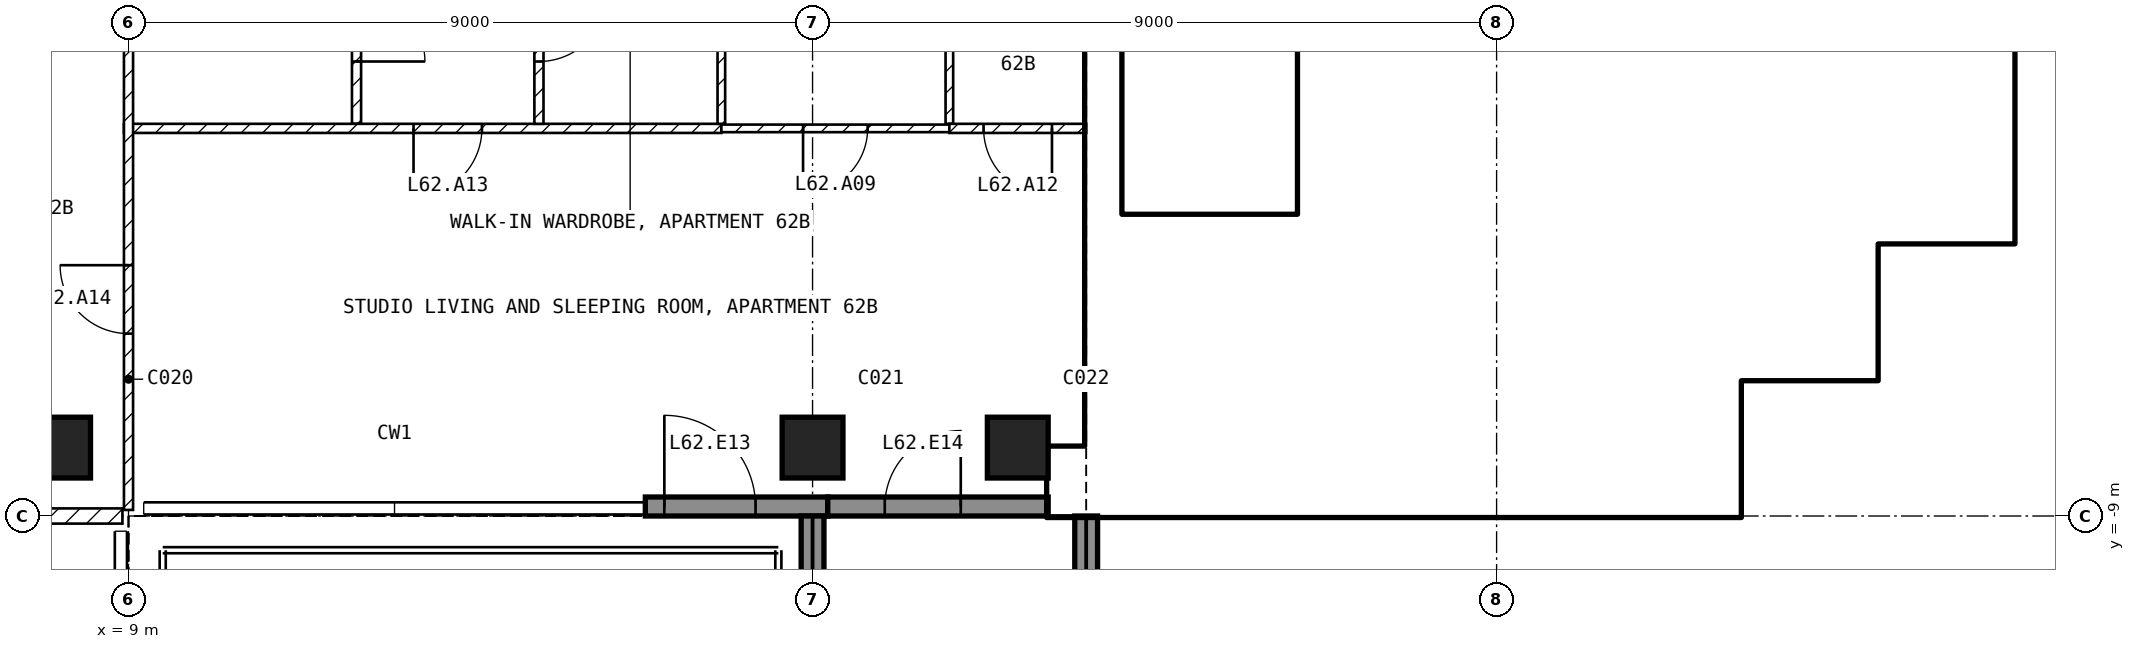
"""IFC4 building model, lengths in metres.
Left out: names, types, materials, properties, quantities, classifications, styles, units other than length and angle.
Written with IfcOpenShell. Run it as: python <this file> out.ifc"""

import sys

from ifc_helpers import new_model, si_unit, direction, frame, frame_2d, origin, origin_2d, place, context, subcontext, project, spatial, rectangle, extrude, element, fill, save


model = new_model("IFC4")
c1 = context("Model", 3, precision=1e-05, world=origin(), true_north=direction((0.0, 1.0)))
c2 = subcontext(c1, "Body", "Model", "MODEL_VIEW")
j1 = project(units=[si_unit("LENGTHUNIT", "METRE"), si_unit("PLANEANGLEUNIT", "RADIAN")], contexts=[c1])
p1 = place(None, origin())
s1 = spatial("IfcSite", under=j1, at=p1, CompositionType="ELEMENT")
p2 = place(p1, origin())
s2 = spatial("IfcBuilding", under=s1, at=p2, CompositionType="ELEMENT")
p3 = place(p2, frame((0.0, 0.0, 246.5)))
s3 = spatial("IfcBuildingStorey", under=s2, at=p3, CompositionType="ELEMENT", Elevation=246.5)
for number, where, z_axis, x_axis in (
    (1, (8.1, -8.1, -0.25), (0.0, 0.0, 1.0), (1.0, 0.0, 0.0)),
    (2, (18.0, -8.1, -0.25), (0.0, 0.0, 1.0), (1.0, 0.0, 0.0)),
    (3, (20.7, -8.1, -0.25), (0.0, 0.0, 1.0), (1.0, 0.0, 0.0)),
):
    element("IfcColumn", number, at=place(p3, frame(where, z_axis=z_axis, x_axis=x_axis)), inside=s3, PredefinedType="COLUMN", context=c2, shape_type="SweptSolid", body=[
        extrude(rectangle(XDim=0.8, YDim=0.8, at=origin_2d()), origin(), (0.0, 0.0, 1.0), 3.5),
    ])
p4 = place(p3, frame((15.8, -8.875, 0.0), z_axis=(0.0, 0.0, 1.0), x_axis=(1.0, 0.0, 0.0)))
e4 = element("IfcWall", 4, at=p4, inside=s3, PredefinedType="SOLIDWALL", context=c2, shape_type="SweptSolid", body=[
    extrude(rectangle(XDim=2.4, YDim=0.25, at=frame_2d((1.2, 0.0))), origin(), (0.0, 0.0, 1.0), 3.25),
])
p5 = place(p4, frame((0.25, 0.0, 0.0)))
e5 = element("IfcOpeningElement", 5, at=p5, cuts=e4, PredefinedType="OPENING", context=c2, shape_type="SweptSolid", body=[
    extrude(rectangle(XDim=1.2, YDim=2.4, at=frame_2d((0.6, 1.2))), frame((0.0, 0.135, 0.0), z_axis=(0.0, -1.0, 0.0), x_axis=(1.0, 0.0, 0.0)), (0.0, 0.0, 1.0), 0.27),
])
p6 = place(p3, frame((18.2, -8.875, 0.0), z_axis=(0.0, 0.0, 1.0), x_axis=(1.0, 0.0, 0.0)))
e6 = element("IfcWall", 6, at=p6, inside=s3, PredefinedType="SOLIDWALL", context=c2, shape_type="SweptSolid", body=[
    extrude(rectangle(XDim=2.9, YDim=0.25, at=frame_2d((1.45, 0.0))), origin(), (0.0, 0.0, 1.0), 3.25),
])
p7 = place(p6, frame((0.75, 0.0, 0.0)))
e7 = element("IfcOpeningElement", 7, at=p7, cuts=e6, PredefinedType="OPENING", context=c2, shape_type="SweptSolid", body=[
    extrude(rectangle(XDim=1.0, YDim=2.4, at=frame_2d((0.5, 1.2))), frame((0.0, 0.135, 0.0), z_axis=(0.0, -1.0, 0.0), x_axis=(1.0, 0.0, 0.0)), (0.0, 0.0, 1.0), 0.27),
])
p8 = place(p3, frame((18.0, -9.0, 0.0), z_axis=(0.0, 0.0, 1.0), x_axis=(0.0, -1.0, 0.0)))
e8 = element("IfcWall", 8, at=p8, inside=s3, PredefinedType="SOLIDWALL", context=c2, shape_type="SweptSolid", body=[
    extrude(rectangle(XDim=2.74, YDim=0.3, at=frame_2d((1.37, 0.0))), origin(), (0.0, 0.0, 1.0), 3.25),
])
p9 = place(p3, frame((21.6, -9.0, 0.0), z_axis=(0.0, 0.0, 1.0), x_axis=(0.0, -1.0, 0.0)))
e9 = element("IfcWall", 9, at=p9, inside=s3, PredefinedType="SOLIDWALL", context=c2, shape_type="SweptSolid", body=[
    extrude(rectangle(XDim=2.7, YDim=0.3, at=frame_2d((1.35, 0.0))), origin(), (0.0, 0.0, 1.0), 3.25),
])
p10 = place(p3, frame((21.1, -8.55, 0.0), z_axis=(0.0, 0.0, 1.0), x_axis=(1.0, 0.0, 0.0)))
e10 = element("IfcWall", 10, at=p10, inside=s3, PredefinedType="SHEAR", context=c2, shape_type="SweptSolid", body=[
    extrude(rectangle(XDim=9.1, YDim=0.9, at=frame_2d((4.55, 0.0))), origin(), (0.0, 0.0, 1.0), 3.25),
])
p11 = place(p3, frame((29.975, -8.1, 0.0), z_axis=(0.0, 0.0, 1.0), x_axis=(0.0, 1.0, 0.0)))
e11 = element("IfcWall", 11, at=p11, inside=s3, PredefinedType="SHEAR", context=c2, shape_type="SweptSolid", body=[
    extrude(rectangle(XDim=1.35, YDim=0.45, at=frame_2d((0.675, 0.0))), origin(), (0.0, 0.0, 1.0), 3.25),
])
for number, where, z_axis, x_axis in (
    (12, (30.2, -6.975, 0.0), (0.0, 0.0, 1.0), (1.0, 0.0, 0.0)),
    (13, (31.775, -6.75, 0.0), (0.0, 0.0, 1.0), (0.0, 1.0, 0.0)),
    (14, (32.0, -5.175, 0.0), (0.0, 0.0, 1.0), (1.0, 0.0, 0.0)),
):
    element("IfcWall", number, at=place(p3, frame(where, z_axis=z_axis, x_axis=x_axis)), inside=s3, PredefinedType="SHEAR", context=c2, shape_type="SweptSolid", body=[
        extrude(rectangle(XDim=1.8, YDim=0.45, at=frame_2d((0.9, 0.0))), origin(), (0.0, 0.0, 1.0), 3.25),
    ])
p12 = place(p3, frame((33.575, -4.95, 0.0), z_axis=(0.0, 0.0, 1.0), x_axis=(0.0, 1.0, 0.0)))
e15 = element("IfcWall", 15, at=p12, inside=s3, PredefinedType="SHEAR", context=c2, shape_type="SweptSolid", body=[
    extrude(rectangle(XDim=10.35, YDim=0.45, at=frame_2d((5.175, 0.0))), origin(), (0.0, 0.0, 1.0), 3.25),
])
p13 = place(p3, frame((21.825, -8.1, 0.0), z_axis=(0.0, 0.0, 1.0), x_axis=(0.0, 1.0, 0.0)))
e16 = element("IfcWall", 16, at=p13, inside=s3, PredefinedType="SHEAR", context=c2, shape_type="SweptSolid", body=[
    extrude(rectangle(XDim=6.9, YDim=0.45, at=frame_2d((3.45, 0.0))), origin(), (0.0, 0.0, 1.0), 3.25),
])
p14 = place(p3, frame((24.5, -5.05, 0.0), z_axis=(0.0, 0.0, 1.0), x_axis=(0.0, 1.0, 0.0)))
e17 = element("IfcWall", 17, at=p14, inside=s3, PredefinedType="SOLIDWALL", context=c2, shape_type="SweptSolid", body=[
    extrude(rectangle(XDim=3.7, YDim=0.2, at=frame_2d((1.85, 0.0))), origin(), (0.0, 0.0, 1.0), 3.25),
])
p15 = place(p14, frame((0.1, 0.0, 0.0)))
e18 = element("IfcOpeningElement", 18, at=p15, cuts=e17, PredefinedType="OPENING", context=c2, shape_type="SweptSolid", body=[
    extrude(rectangle(XDim=0.8, YDim=2.1, at=frame_2d((0.4, 1.05))), frame((0.0, 0.11, 0.0), z_axis=(0.0, -1.0, 0.0), x_axis=(1.0, 0.0, 0.0)), (0.0, 0.0, 1.0), 0.22),
])
p16 = place(p3, frame((22.05, -5.15, 0.0), z_axis=(0.0, 0.0, 1.0), x_axis=(1.0, 0.0, 0.0)))
e19 = element("IfcWall", 19, at=p16, inside=s3, PredefinedType="SOLIDWALL", context=c2, shape_type="SweptSolid", body=[
    extrude(rectangle(XDim=6.3, YDim=0.2, at=frame_2d((3.15, 0.0))), origin(), (0.0, 0.0, 1.0), 3.25),
])
p17 = place(p16, frame((0.2, 0.0, 0.0)))
e20 = element("IfcOpeningElement", 20, at=p17, cuts=e19, PredefinedType="OPENING", context=c2, shape_type="SweptSolid", body=[
    extrude(rectangle(XDim=1.0, YDim=2.1, at=frame_2d((0.5, 1.05))), frame((0.0, 0.11, 0.0), z_axis=(0.0, -1.0, 0.0), x_axis=(1.0, 0.0, 0.0)), (0.0, 0.0, 1.0), 0.22),
])
p18 = place(p3, frame((28.25, -8.1, 0.0), z_axis=(0.0, 0.0, 1.0), x_axis=(0.0, 1.0, 0.0)))
e21 = element("IfcWall", 21, at=p18, inside=s3, PredefinedType="SOLIDWALL", context=c2, shape_type="SweptSolid", body=[
    extrude(rectangle(XDim=2.85, YDim=0.2, at=frame_2d((1.425, 0.0))), origin(), (0.0, 0.0, 1.0), 3.25),
])
p19 = place(p3, frame((24.6, -3.95, 0.0), z_axis=(0.0, 0.0, 1.0), x_axis=(1.0, 0.0, 0.0)))
e22 = element("IfcWall", 22, at=p19, inside=s3, PredefinedType="SOLIDWALL", context=c2, shape_type="SweptSolid", body=[
    extrude(rectangle(XDim=8.75, YDim=0.2, at=frame_2d((4.375, 0.0))), origin(), (0.0, 0.0, 1.0), 3.25),
])
for number, where, z_axis, x_axis in (
    (23, (26.5, -3.85, 0.0), (0.0, 0.0, 1.0), (0.0, 1.0, 0.0)),
    (24, (28.5, -3.85, 0.0), (0.0, 0.0, 1.0), (0.0, 1.0, 0.0)),
    (25, (30.5, -3.85, 0.0), (0.0, 0.0, 1.0), (0.0, 1.0, 0.0)),
):
    element("IfcWall", number, at=place(p3, frame(where, z_axis=z_axis, x_axis=x_axis)), inside=s3, PredefinedType="SOLIDWALL", context=c2, shape_type="SweptSolid", body=[
        extrude(rectangle(XDim=2.3, YDim=0.2, at=frame_2d((1.15, 0.0))), origin(), (0.0, 0.0, 1.0), 3.25),
    ])
p20 = place(p3, frame((8.92, -9.0, 0.0), z_axis=(0.0, 0.0, 1.0), x_axis=(-1.0, 0.0, 0.0)))
e26 = element("IfcWall", 26, at=p20, inside=s3, PredefinedType="PARTITIONING", context=c2, shape_type="SweptSolid", body=[
    extrude(rectangle(XDim=17.84, YDim=0.2, at=frame_2d((8.92, 0.0))), origin(), (0.0, 0.0, 1.0), 3.25),
])
p21 = place(p20, frame((8.42, 0.0, 0.0)))
e27 = element("IfcOpeningElement", 27, at=p21, cuts=e26, PredefinedType="OPENING", context=c2, shape_type="SweptSolid", body=[
    extrude(rectangle(XDim=1.0, YDim=2.1, at=frame_2d((0.5, 1.05))), frame((0.0, 0.11, 0.0), z_axis=(0.0, -1.0, 0.0), x_axis=(1.0, 0.0, 0.0)), (0.0, 0.0, 1.0), 0.22),
])
p22 = place(p3, frame((12.0, -1.3, 0.0), z_axis=(0.0, 0.0, 1.0), x_axis=(0.0, -1.0, 0.0)))
e28 = element("IfcWall", 28, at=p22, inside=s3, PredefinedType="PARTITIONING", context=c2, shape_type="SweptSolid", body=[
    extrude(rectangle(XDim=2.54, YDim=0.12, at=frame_2d((1.27, 0.0))), origin(), (0.0, 0.0, 1.0), 3.25),
])
p23 = place(p22, frame((0.82, 0.0, 0.0)))
e29 = element("IfcOpeningElement", 29, at=p23, cuts=e28, PredefinedType="OPENING", context=c2, shape_type="SweptSolid", body=[
    extrude(rectangle(XDim=0.9, YDim=2.1, at=frame_2d((0.45, 1.05))), frame((0.0, 0.07, 0.0), z_axis=(0.0, -1.0, 0.0), x_axis=(1.0, 0.0, 0.0)), (0.0, 0.0, 1.0), 0.14),
])
p24 = place(p3, frame((16.8, -3.9, 0.0), z_axis=(0.0, 0.0, 1.0), x_axis=(-1.0, 0.0, 0.0)))
e30 = element("IfcWall", 30, at=p24, inside=s3, PredefinedType="PARTITIONING", context=c2, shape_type="SweptSolid", body=[
    extrude(rectangle(XDim=7.86, YDim=0.12, at=frame_2d((3.93, 0.0))), origin(), (0.0, 0.0, 1.0), 3.25),
])
p25 = place(p24, frame((3.15, 0.0, 0.0)))
e31 = element("IfcOpeningElement", 31, at=p25, cuts=e30, PredefinedType="OPENING", context=c2, shape_type="SweptSolid", body=[
    extrude(rectangle(XDim=0.9, YDim=2.1, at=frame_2d((0.45, 1.05))), frame((0.0, 0.07, 0.0), z_axis=(0.0, -1.0, 0.0), x_axis=(1.0, 0.0, 0.0)), (0.0, 0.0, 1.0), 0.14),
])
p26 = place(p3, frame((9.0, -8.92, 0.0), z_axis=(0.0, 0.0, 1.0), x_axis=(0.0, 1.0, 0.0)))
e32 = element("IfcWall", 32, at=p26, inside=s3, PredefinedType="PARTITIONING", context=c2, shape_type="SweptSolid", body=[
    extrude(rectangle(XDim=7.62, YDim=0.12, at=frame_2d((3.81, 0.0))), origin(), (0.0, 0.0, 1.0), 3.25),
])
p27 = place(p26, frame((2.32, 0.0, 0.0)))
e33 = element("IfcOpeningElement", 33, at=p27, cuts=e32, PredefinedType="OPENING", context=c2, shape_type="SweptSolid", body=[
    extrude(rectangle(XDim=0.9, YDim=2.1, at=frame_2d((0.45, 1.05))), frame((0.0, 0.07, 0.0), z_axis=(0.0, -1.0, 0.0), x_axis=(1.0, 0.0, 0.0)), (0.0, 0.0, 1.0), 0.14),
])
p28 = place(p3, frame((14.4, -1.3, 0.0), z_axis=(0.0, 0.0, 1.0), x_axis=(0.0, -1.0, 0.0)))
e34 = element("IfcWall", 34, at=p28, inside=s3, PredefinedType="PARTITIONING", context=c2, shape_type="SweptSolid", body=[
    extrude(rectangle(XDim=2.54, YDim=0.12, at=frame_2d((1.27, 0.0))), origin(), (0.0, 0.0, 1.0), 3.25),
])
p29 = place(p28, frame((0.82, 0.0, 0.0)))
e35 = element("IfcOpeningElement", 35, at=p29, cuts=e34, PredefinedType="OPENING", context=c2, shape_type="SweptSolid", body=[
    extrude(rectangle(XDim=0.9, YDim=2.1, at=frame_2d((0.45, 1.05))), frame((0.0, 0.07, 0.0), z_axis=(0.0, -1.0, 0.0), x_axis=(1.0, 0.0, 0.0)), (0.0, 0.0, 1.0), 0.14),
])
for number, where, z_axis, x_axis in (
    (36, (16.8, -1.3, 0.0), (0.0, 0.0, 1.0), (0.0, -1.0, 0.0)),
    (37, (19.8, -1.3, 0.0), (0.0, 0.0, 1.0), (0.0, -1.0, 0.0)),
):
    element("IfcWall", number, at=place(p3, frame(where, z_axis=z_axis, x_axis=x_axis)), inside=s3, PredefinedType="PARTITIONING", context=c2, shape_type="SweptSolid", body=[
        extrude(rectangle(XDim=2.54, YDim=0.1, at=frame_2d((1.27, 0.0))), origin(), (0.0, 0.0, 1.0), 3.25),
    ])
p30 = place(p3, frame((19.8, -3.9, 0.0), z_axis=(0.0, 0.0, 1.0), x_axis=(-1.0, 0.0, 0.0)))
e38 = element("IfcWall", 38, at=p30, inside=s3, PredefinedType="PARTITIONING", context=c2, shape_type="SweptSolid", body=[
    extrude(rectangle(XDim=3.0, YDim=0.1, at=frame_2d((1.5, 0.0))), origin(), (0.0, 0.0, 1.0), 3.25),
])
p31 = place(p30, frame((1.075, 0.0, 0.0)))
e39 = element("IfcOpeningElement", 39, at=p31, cuts=e38, PredefinedType="OPENING", context=c2, shape_type="SweptSolid", body=[
    extrude(rectangle(XDim=0.85, YDim=2.1, at=frame_2d((0.425, 1.05))), frame((0.0, 0.06, 0.0), z_axis=(0.0, -1.0, 0.0), x_axis=(1.0, 0.0, 0.0)), (0.0, 0.0, 1.0), 0.12),
])
p32 = place(p3, frame((21.6, -3.9, 0.0), z_axis=(0.0, 0.0, 1.0), x_axis=(-1.0, 0.0, 0.0)))
e40 = element("IfcWall", 40, at=p32, inside=s3, PredefinedType="PARTITIONING", context=c2, shape_type="SweptSolid", body=[
    extrude(rectangle(XDim=1.8, YDim=0.12, at=frame_2d((0.9, 0.0))), origin(), (0.0, 0.0, 1.0), 3.25),
])
p33 = place(p32, frame((0.45, 0.0, 0.0)))
e41 = element("IfcOpeningElement", 41, at=p33, cuts=e40, PredefinedType="OPENING", context=c2, shape_type="SweptSolid", body=[
    extrude(rectangle(XDim=0.9, YDim=2.1, at=frame_2d((0.45, 1.05))), frame((0.0, 0.07, 0.0), z_axis=(0.0, -1.0, 0.0), x_axis=(1.0, 0.0, 0.0)), (0.0, 0.0, 1.0), 0.14),
])
p34 = place(p5, origin())
e42 = element("IfcDoor", 42, at=p34, inside=s3, OperationType="SINGLE_SWING_LEFT", PredefinedType="DOOR", context=c2, shape_type="SweptSolid", body=[
    extrude(rectangle(XDim=1.2, YDim=2.4, at=frame_2d((0.6, 1.2))), frame((0.0, 0.025, 0.0), z_axis=(0.0, -1.0, 0.0), x_axis=(1.0, 0.0, 0.0)), (0.0, 0.0, 1.0), 0.05),
])
fill(e5, e42)
p35 = place(p7, origin())
e43 = element("IfcDoor", 43, at=p35, inside=s3, OperationType="SINGLE_SWING_RIGHT", PredefinedType="DOOR", context=c2, shape_type="SweptSolid", body=[
    extrude(rectangle(XDim=1.0, YDim=2.4, at=frame_2d((0.5, 1.2))), frame((0.0, 0.025, 0.0), z_axis=(0.0, -1.0, 0.0), x_axis=(1.0, 0.0, 0.0)), (0.0, 0.0, 1.0), 0.05),
])
fill(e7, e43)
p36 = place(p17, origin())
e44 = element("IfcDoor", 44, at=p36, inside=s3, OperationType="SINGLE_SWING_LEFT", PredefinedType="DOOR", context=c2, shape_type="SweptSolid", body=[
    extrude(rectangle(XDim=1.0, YDim=2.1, at=frame_2d((0.5, 1.05))), frame((0.0, 0.025, 0.0), z_axis=(0.0, -1.0, 0.0), x_axis=(1.0, 0.0, 0.0)), (0.0, 0.0, 1.0), 0.05),
])
fill(e20, e44)
p37 = place(p15, origin())
e45 = element("IfcDoor", 45, at=p37, inside=s3, OperationType="SINGLE_SWING_LEFT", PredefinedType="DOOR", context=c2, shape_type="SweptSolid", body=[
    extrude(rectangle(XDim=0.8, YDim=2.1, at=frame_2d((0.4, 1.05))), frame((0.0, 0.025, 0.0), z_axis=(0.0, -1.0, 0.0), x_axis=(1.0, 0.0, 0.0)), (0.0, 0.0, 1.0), 0.05),
])
fill(e18, e45)
p38 = place(p31, origin())
e46 = element("IfcDoor", 46, at=p38, inside=s3, OperationType="SINGLE_SWING_RIGHT", PredefinedType="DOOR", context=c2, shape_type="SweptSolid", body=[
    extrude(rectangle(XDim=0.85, YDim=2.1, at=frame_2d((0.425, 1.05))), frame((0.0, 0.025, 0.0), z_axis=(0.0, -1.0, 0.0), x_axis=(1.0, 0.0, 0.0)), (0.0, 0.0, 1.0), 0.05),
])
fill(e39, e46)
p39 = place(p23, origin())
e47 = element("IfcDoor", 47, at=p39, inside=s3, OperationType="SINGLE_SWING_RIGHT", PredefinedType="DOOR", context=c2, shape_type="SweptSolid", body=[
    extrude(rectangle(XDim=0.9, YDim=2.1, at=frame_2d((0.45, 1.05))), frame((0.0, 0.025, 0.0), z_axis=(0.0, -1.0, 0.0), x_axis=(1.0, 0.0, 0.0)), (0.0, 0.0, 1.0), 0.05),
])
fill(e29, e47)
p40 = place(p33, origin())
e48 = element("IfcDoor", 48, at=p40, inside=s3, OperationType="SINGLE_SWING_LEFT", PredefinedType="DOOR", context=c2, shape_type="SweptSolid", body=[
    extrude(rectangle(XDim=0.9, YDim=2.1, at=frame_2d((0.45, 1.05))), frame((0.0, 0.025, 0.0), z_axis=(0.0, -1.0, 0.0), x_axis=(1.0, 0.0, 0.0)), (0.0, 0.0, 1.0), 0.05),
])
fill(e41, e48)
p41 = place(p25, origin())
e49 = element("IfcDoor", 49, at=p41, inside=s3, OperationType="SINGLE_SWING_RIGHT", PredefinedType="DOOR", context=c2, shape_type="SweptSolid", body=[
    extrude(rectangle(XDim=0.9, YDim=2.1, at=frame_2d((0.45, 1.05))), frame((0.0, 0.025, 0.0), z_axis=(0.0, -1.0, 0.0), x_axis=(1.0, 0.0, 0.0)), (0.0, 0.0, 1.0), 0.05),
])
fill(e31, e49)
p42 = place(p27, origin())
e50 = element("IfcDoor", 50, at=p42, inside=s3, OperationType="SINGLE_SWING_RIGHT", PredefinedType="DOOR", context=c2, shape_type="SweptSolid", body=[
    extrude(rectangle(XDim=0.9, YDim=2.1, at=frame_2d((0.45, 1.05))), frame((0.0, 0.025, 0.0), z_axis=(0.0, -1.0, 0.0), x_axis=(1.0, 0.0, 0.0)), (0.0, 0.0, 1.0), 0.05),
])
fill(e33, e50)
p43 = place(p29, origin())
e51 = element("IfcDoor", 51, at=p43, inside=s3, OperationType="SINGLE_SWING_LEFT", PredefinedType="DOOR", context=c2, shape_type="SweptSolid", body=[
    extrude(rectangle(XDim=0.9, YDim=2.1, at=frame_2d((0.45, 1.05))), frame((0.0, 0.025, 0.0), z_axis=(0.0, -1.0, 0.0), x_axis=(1.0, 0.0, 0.0)), (0.0, 0.0, 1.0), 0.05),
])
fill(e35, e51)
save(model, sys.argv[1])
